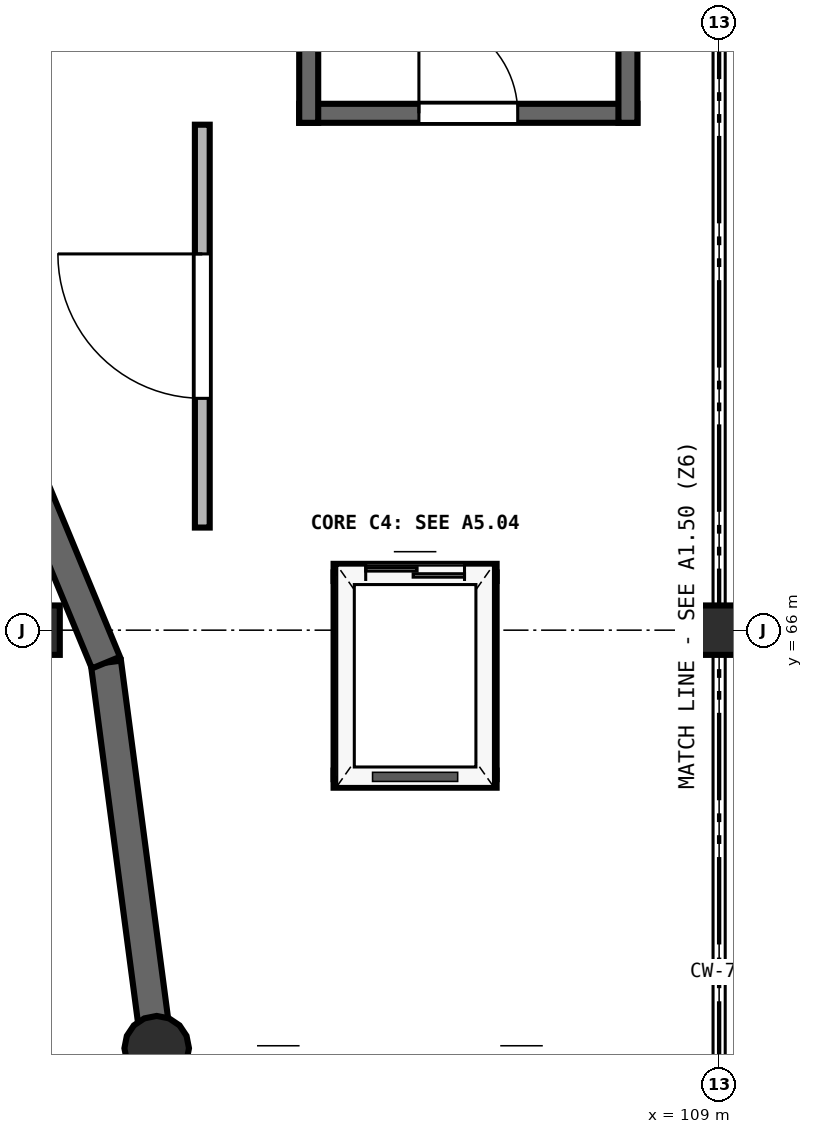
"""IFC4 building model, lengths in metres.
Left out: names, types, materials, properties, quantities, classifications, styles, units other than length and angle.
Written with IfcOpenShell. Run it as: python <this file> out.ifc"""

import sys

from ifc_helpers import new_model, si_unit, direction, frame, frame_2d, origin, origin_2d, place, context, subcontext, project, spatial, rectangle, circle, extrude, element, fill, save


model = new_model("IFC4")
c1 = context("Model", 3, precision=1e-05, world=origin(), true_north=direction((0.0, 1.0)))
c2 = subcontext(c1, "Body", "Model", "MODEL_VIEW")
j1 = project(units=[si_unit("LENGTHUNIT", "METRE"), si_unit("PLANEANGLEUNIT", "RADIAN")], contexts=[c1])
p1 = place(None, origin())
s1 = spatial("IfcSite", under=j1, at=p1, CompositionType="ELEMENT")
p2 = place(p1, origin())
s2 = spatial("IfcBuilding", under=s1, at=p2, CompositionType="ELEMENT")
p3 = place(p2, frame((0.0, 0.0, 19.2)))
s3 = spatial("IfcBuildingStorey", under=s2, at=p3, CompositionType="ELEMENT", Elevation=19.2)
for number, where, z_axis, x_axis in (
    (1, (100.0, 66.0, 0.0), (0.0, 0.0, 1.0), (1.0, 0.0, 0.0)),
    (2, (109.0, 66.0, 0.0), (0.0, 0.0, 1.0), (1.0, 0.0, 0.0)),
):
    element("IfcColumn", number, at=place(p3, frame(where, z_axis=z_axis, x_axis=x_axis)), inside=s3, PredefinedType="COLUMN", context=c2, shape_type="SweptSolid", body=[
        extrude(rectangle(XDim=0.65, YDim=0.65, at=origin_2d()), origin(), (0.0, 0.0, 1.0), 4.25),
    ])
p4 = place(p3, frame((101.6, 60.5, 0.0), z_axis=(0.0, 0.0, 1.0), x_axis=(1.0, 0.0, 0.0)))
e3 = element("IfcColumn", 3, at=p4, inside=s3, PredefinedType="COLUMN", context=c2, shape_type="SweptSolid", body=[
    extrude(circle(Radius=0.425, at=origin_2d()), origin(), (0.0, 0.0, 1.0), 4.25),
])
p5 = place(p3, frame((101.6, 60.5, 0.0), z_axis=(0.0, 0.0, 1.0), x_axis=(-0.130591512704, 0.99143625958, 0.0)))
e4 = element("IfcWall", 4, at=p5, inside=s3, PredefinedType="SHEAR", context=c2, shape_type="SweptSolid", body=[
    extrude(rectangle(XDim=5.117, YDim=0.4, at=frame_2d((2.558, 0.0))), origin(), (0.0, 0.0, 1.0), 4.25),
])
p6 = place(p3, frame((100.932, 65.573, 0.0), z_axis=(0.0, 0.0, 1.0), x_axis=(-0.382642581018, 0.923896452635, 0.0)))
e5 = element("IfcWall", 5, at=p6, inside=s3, PredefinedType="SHEAR", context=c2, shape_type="SweptSolid", body=[
    extrude(rectangle(XDim=5.116, YDim=0.4, at=frame_2d((2.558, 0.0))), origin(), (0.0, 0.0, 1.0), 4.25),
])
p7 = place(p3, frame((100.932, 55.427, 0.0), z_axis=(0.0, 0.0, 1.0), x_axis=(0.130591512704, 0.99143625958, 0.0)))
e6 = element("IfcWall", 6, at=p7, inside=s3, PredefinedType="SHEAR", context=c2, shape_type="SweptSolid", body=[
    extrude(rectangle(XDim=5.117, YDim=0.4, at=frame_2d((2.558, 0.0))), origin(), (0.0, 0.0, 1.0), 4.25),
])
p8 = place(p3, frame((103.475, 72.8, 0.0), z_axis=(0.0, 0.0, 1.0), x_axis=(1.0, 0.0, 0.0)))
e7 = element("IfcWall", 7, at=p8, inside=s3, PredefinedType="SHEAR", context=c2, shape_type="SweptSolid", body=[
    extrude(rectangle(XDim=4.45, YDim=0.25, at=frame_2d((2.225, 0.0))), origin(), (0.0, 0.0, 1.0), 4.25),
])
p9 = place(p8, frame((1.575, 0.0, 0.0)))
e8 = element("IfcOpeningElement", 8, at=p9, cuts=e7, PredefinedType="OPENING", context=c2, shape_type="SweptSolid", body=[
    extrude(rectangle(XDim=1.3, YDim=2.18, at=frame_2d((0.65, 1.09))), frame((0.0, 0.135, 0.0), z_axis=(0.0, -1.0, 0.0), x_axis=(1.0, 0.0, 0.0)), (0.0, 0.0, 1.0), 0.27),
])
for number, where, z_axis, x_axis in (
    (9, (103.6, 72.675, 0.0), (0.0, 0.0, 1.0), (0.0, 1.0, 0.0)),
    (10, (107.8, 72.675, 0.0), (0.0, 0.0, 1.0), (0.0, 1.0, 0.0)),
):
    element("IfcWall", number, at=place(p3, frame(where, z_axis=z_axis, x_axis=x_axis)), inside=s3, PredefinedType="SHEAR", context=c2, shape_type="SweptSolid", body=[
        extrude(rectangle(XDim=11.09, YDim=0.25, at=frame_2d((5.545, 0.0))), origin(), (0.0, 0.0, 1.0), 4.25),
    ])
p10 = place(p3, frame((102.2, 67.35, 0.0), z_axis=(0.0, 0.0, 1.0), x_axis=(0.0, 1.0, 0.0)))
e11 = element("IfcWall", 11, at=p10, inside=s3, PredefinedType="PARTITIONING", context=c2, shape_type="SweptSolid", body=[
    extrude(rectangle(XDim=5.3, YDim=0.195, at=frame_2d((2.65, 0.0))), origin(), (0.0, 0.0, 1.0), 4.2),
])
p11 = place(p10, frame((1.7, 0.0, 0.0)))
e12 = element("IfcOpeningElement", 12, at=p11, cuts=e11, PredefinedType="OPENING", context=c2, shape_type="SweptSolid", body=[
    extrude(rectangle(XDim=1.9, YDim=2.3, at=frame_2d((0.95, 1.15))), frame((0.0, 0.107, 0.0), z_axis=(0.0, -1.0, 0.0), x_axis=(1.0, 0.0, 0.0)), (0.0, 0.0, 1.0), 0.215),
])
p12 = place(p3, frame((103.927, 66.76, 0.0), z_axis=(0.0, 0.0, 1.0), x_axis=(1.0, 0.0, 0.0)))
e13 = element("IfcWall", 13, at=p12, inside=s3, PredefinedType="SOLIDWALL", context=c2, shape_type="SweptSolid", body=[
    extrude(rectangle(XDim=2.145, YDim=0.225, at=frame_2d((1.073, 0.0))), origin(), (0.0, 0.0, 1.0), 4.2),
])
p13 = place(p12, frame((0.423, 0.0, 0.0)))
e14 = element("IfcOpeningElement", 14, at=p13, cuts=e13, PredefinedType="OPENING", context=c2, shape_type="SweptSolid", body=[
    extrude(rectangle(XDim=1.3, YDim=2.25, at=frame_2d((0.65, 1.125))), frame((0.0, 0.123, 0.0), z_axis=(0.0, -1.0, 0.0), x_axis=(1.0, 0.0, 0.0)), (0.0, 0.0, 1.0), 0.245),
])
p14 = place(p3, frame((103.927, 64.04, 0.0), z_axis=(0.0, 0.0, 1.0), x_axis=(1.0, 0.0, 0.0)))
e15 = element("IfcWall", 15, at=p14, inside=s3, PredefinedType="SOLIDWALL", context=c2, shape_type="SweptSolid", body=[
    extrude(rectangle(XDim=2.145, YDim=0.225, at=frame_2d((1.073, 0.0))), origin(), (0.0, 0.0, 1.0), 4.2),
])
for number, where, z_axis, x_axis in (
    (16, (104.04, 64.04, 0.0), (0.0, 0.0, 1.0), (0.0, 1.0, 0.0)),
    (17, (105.96, 64.04, 0.0), (0.0, 0.0, 1.0), (0.0, 1.0, 0.0)),
):
    element("IfcWall", number, at=place(p3, frame(where, z_axis=z_axis, x_axis=x_axis)), inside=s3, PredefinedType="SOLIDWALL", context=c2, shape_type="SweptSolid", body=[
        extrude(rectangle(XDim=2.72, YDim=0.225, at=frame_2d((1.36, 0.0))), origin(), (0.0, 0.0, 1.0), 4.2),
    ])
p15 = place(p9, origin())
e18 = element("IfcDoor", 18, at=p15, inside=s3, OperationType="SINGLE_SWING_LEFT", PredefinedType="DOOR", context=c2, shape_type="SweptSolid", body=[
    extrude(rectangle(XDim=1.3, YDim=2.18, at=frame_2d((0.65, 1.09))), frame((0.0, 0.025, 0.0), z_axis=(0.0, -1.0, 0.0), x_axis=(1.0, 0.0, 0.0)), (0.0, 0.0, 1.0), 0.05),
])
fill(e8, e18)
p16 = place(p11, origin())
e19 = element("IfcDoor", 19, at=p16, inside=s3, OperationType="SINGLE_SWING_RIGHT", PredefinedType="DOOR", context=c2, shape_type="SweptSolid", body=[
    extrude(rectangle(XDim=1.9, YDim=2.3, at=frame_2d((0.95, 1.15))), frame((0.0, 0.025, 0.0), z_axis=(0.0, -1.0, 0.0), x_axis=(1.0, 0.0, 0.0)), (0.0, 0.0, 1.0), 0.05),
])
fill(e12, e19)
p17 = place(p13, origin())
e20 = element("IfcDoor", 20, at=p17, inside=s3, OperationType="DOUBLE_DOOR_SLIDING", PredefinedType="DOOR", context=c2, shape_type="SweptSolid", body=[
    extrude(rectangle(XDim=1.3, YDim=2.25, at=frame_2d((0.65, 1.125))), frame((0.0, 0.025, 0.0), z_axis=(0.0, -1.0, 0.0), x_axis=(1.0, 0.0, 0.0)), (0.0, 0.0, 1.0), 0.05),
])
fill(e14, e20)
save(model, sys.argv[1])
